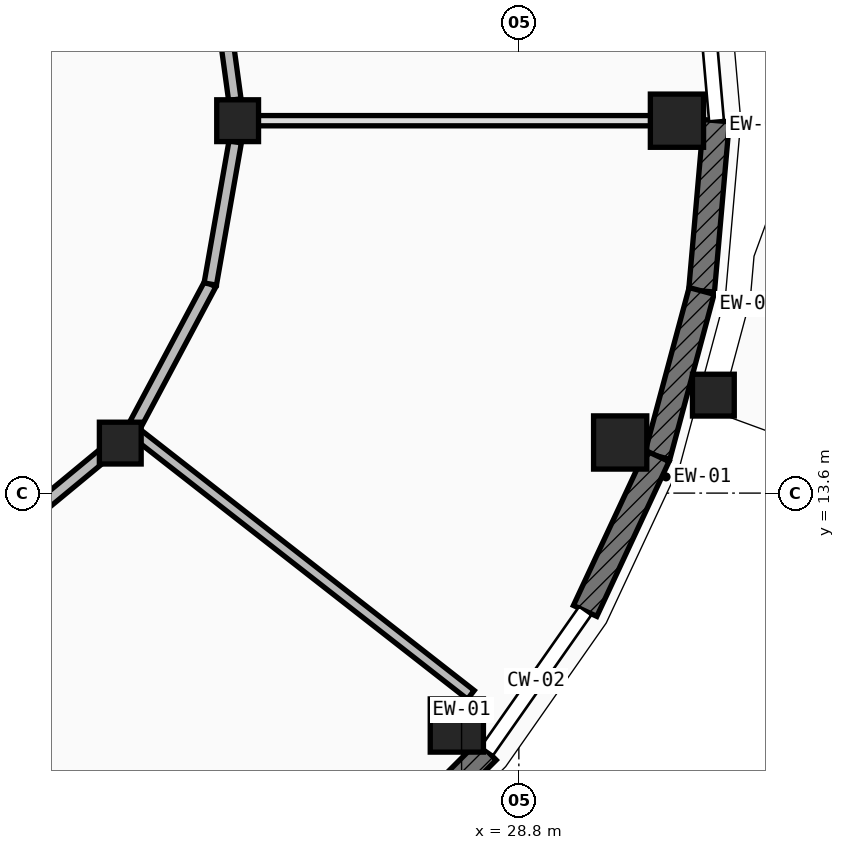
"""IFC4 building model, lengths in metres.
Left out: names, types, materials, properties, quantities, classifications, styles, units other than length and angle.
Written with IfcOpenShell. Run it as: python <this file> out.ifc"""

import sys

from ifc_helpers import new_model, si_unit, direction, frame, frame_2d, origin, origin_2d, place, context, subcontext, project, spatial, rectangle, circle, extrude, element, fill, save


model = new_model("IFC4")
c1 = context("Model", 3, precision=1e-05, world=origin(), true_north=direction((0.0, 1.0)))
c2 = subcontext(c1, "Body", "Model", "MODEL_VIEW")
j1 = project(units=[si_unit("LENGTHUNIT", "METRE"), si_unit("PLANEANGLEUNIT", "RADIAN")], contexts=[c1])
p1 = place(None, origin())
s1 = spatial("IfcSite", under=j1, at=p1, CompositionType="ELEMENT")
p2 = place(p1, origin())
s2 = spatial("IfcBuilding", under=s1, at=p2, CompositionType="ELEMENT")
p3 = place(p2, origin())
s3 = spatial("IfcBuildingStorey", under=s2, at=p3, CompositionType="ELEMENT", Elevation=0.0)
for number, where, z_axis, x_axis in (
    (1, (30.88, 18.5, 0.0), (0.0, 0.0, 1.0), (1.0, 0.0, 0.0)),
    (2, (27.984, 10.542, 0.0), (0.0, 0.0, 1.0), (1.0, 0.0, 0.0)),
    (3, (30.133, 14.266, 0.0), (0.0, 0.0, 1.0), (1.0, 0.0, 0.0)),
):
    element("IfcColumn", number, at=place(p3, frame(where, z_axis=z_axis, x_axis=x_axis)), inside=s3, PredefinedType="COLUMN", context=c2, shape_type="SweptSolid", body=[
        extrude(circle(Radius=0.35, at=origin_2d()), origin(), (0.0, 0.0, 1.0), 4.55),
    ])
for number, where, z_axis, x_axis in (
    (4, (25.1, 18.5, 0.0), (0.0, 0.0, 1.0), (1.0, 0.0, 0.0)),
    (5, (23.556, 14.258, 0.0), (0.0, 0.0, 1.0), (1.0, 0.0, 0.0)),
):
    element("IfcColumn", number, at=place(p3, frame(where, z_axis=z_axis, x_axis=x_axis)), inside=s3, PredefinedType="COLUMN", context=c2, shape_type="SweptSolid", body=[
        extrude(rectangle(XDim=0.55, YDim=0.55, at=origin_2d()), origin(), (0.0, 0.0, 1.0), 4.55),
    ])
p4 = place(p3, frame((31.359, 14.889, 0.0), z_axis=(0.0, 0.0, 1.0), x_axis=(1.0, 0.0, 0.0)))
e6 = element("IfcColumn", 6, at=p4, inside=s3, PredefinedType="PILASTER", context=c2, shape_type="SweptSolid", body=[
    extrude(circle(Radius=0.275, at=origin_2d()), origin(), (0.0, 0.0, 1.0), 4.55),
])
p5 = place(p3, frame((31.4, 18.5, 0.0), z_axis=(0.0, 0.0, 1.0), x_axis=(-0.087079400775, -0.996201374201, 0.0)))
e7 = element("IfcWall", 7, at=p5, inside=s3, PredefinedType="SOLIDWALL", context=c2, shape_type="SweptSolid", body=[
    extrude(rectangle(XDim=2.249, YDim=0.34, at=frame_2d((1.124, 0.0))), origin(), (0.0, 0.0, 1.0), 3.659),
])
p6 = place(p3, frame((31.204, 16.26, 0.0), z_axis=(0.0, 0.0, 1.0), x_axis=(-0.258824721145, -0.96592430538, 0.0)))
e8 = element("IfcWall", 8, at=p6, inside=s3, PredefinedType="SOLIDWALL", context=c2, shape_type="SweptSolid", body=[
    extrude(rectangle(XDim=2.249, YDim=0.34, at=frame_2d((1.125, 0.0))), origin(), (0.0, 0.0, 1.0), 3.659),
])
p7 = place(p3, frame((30.622, 14.088, 0.0), z_axis=(0.0, 0.0, 1.0), x_axis=(-0.422504983593, -0.906360600886, 0.0)))
e9 = element("IfcWall", 9, at=p7, inside=s3, PredefinedType="SOLIDWALL", context=c2, shape_type="SweptSolid", body=[
    extrude(rectangle(XDim=2.248, YDim=0.34, at=frame_2d((1.124, 0.0))), origin(), (0.0, 0.0, 1.0), 3.659),
])
p8 = place(p3, frame((28.382, 10.208, 0.0), z_axis=(0.0, 0.0, 1.0), x_axis=(-0.707106781187, -0.707106781187, 0.0)))
e10 = element("IfcWall", 10, at=p8, inside=s3, PredefinedType="SOLIDWALL", context=c2, shape_type="SweptSolid", body=[
    extrude(rectangle(XDim=2.249, YDim=0.34, at=frame_2d((1.125, 0.0))), origin(), (0.0, 0.0, 1.0), 3.659),
])
p9 = place(p3, frame((23.766, 14.386, 0.0), z_axis=(0.0, 0.0, 1.0), x_axis=(0.787938235079, -0.615754283542, 0.0)))
e11 = element("IfcWall", 11, at=p9, inside=s3, PredefinedType="PARTITIONING", context=c2, shape_type="SweptSolid", body=[
    extrude(rectangle(XDim=5.587, YDim=0.145, at=frame_2d((2.793, 0.0))), origin(), (0.0, 0.0, 1.0), 3.634),
])
p10 = place(p3, frame((25.183, 18.5, 0.0), z_axis=(0.0, 0.0, 1.0), x_axis=(1.0, 0.0, 0.0)))
e12 = element("IfcWall", 12, at=p10, inside=s3, PredefinedType="PLUMBINGWALL", context=c2, shape_type="SweptSolid", body=[
    extrude(rectangle(XDim=5.616, YDim=0.135, at=frame_2d((2.808, 0.0))), origin(), (0.0, 0.0, 1.0), 3.634),
])
p11 = place(p3, frame((21.934, 12.95, 0.0), z_axis=(0.0, 0.0, 1.0), x_axis=(0.770643994758, 0.63726590474, 0.0)))
e13 = element("IfcWall", 13, at=p11, inside=s3, PredefinedType="PARTITIONING", context=c2, shape_type="SweptSolid", body=[
    extrude(rectangle(XDim=1.805, YDim=0.165, at=frame_2d((0.902, 0.0))), origin(), (0.0, 0.0, 1.0), 3.634),
])
p12 = place(p11, frame((0.332, 0.0, 0.0)))
e14 = element("IfcOpeningElement", 14, at=p12, cuts=e13, PredefinedType="OPENING", context=c2, shape_type="SweptSolid", body=[
    extrude(rectangle(XDim=1.14, YDim=2.28, at=frame_2d((0.57, 1.14))), frame((0.0, 0.093, 0.0), z_axis=(0.0, -1.0, 0.0), x_axis=(1.0, 0.0, 0.0)), (0.0, 0.0, 1.0), 0.185),
])
p13 = place(p3, frame((23.761, 14.514, 0.0), z_axis=(0.0, 0.0, 1.0), x_axis=(0.470283853227, 0.882515210857, 0.0)))
e15 = element("IfcWall", 15, at=p13, inside=s3, PredefinedType="PARTITIONING", context=c2, shape_type="SweptSolid", body=[
    extrude(rectangle(XDim=2.082, YDim=0.165, at=frame_2d((1.041, 0.0))), origin(), (0.0, 0.0, 1.0), 3.634),
])
p14 = place(p13, frame((0.411, 0.0, 0.0)))
e16 = element("IfcOpeningElement", 16, at=p14, cuts=e15, PredefinedType="OPENING", context=c2, shape_type="SweptSolid", body=[
    extrude(rectangle(XDim=1.26, YDim=2.28, at=frame_2d((0.63, 1.14))), frame((0.0, 0.093, 0.0), z_axis=(0.0, -1.0, 0.0), x_axis=(1.0, 0.0, 0.0)), (0.0, 0.0, 1.0), 0.185),
])
p15 = place(p3, frame((24.74, 16.351, 0.0), z_axis=(0.0, 0.0, 1.0), x_axis=(0.172751349053, 0.984965467111, 0.0)))
e17 = element("IfcWall", 17, at=p15, inside=s3, PredefinedType="PARTITIONING", context=c2, shape_type="SweptSolid", body=[
    extrude(rectangle(XDim=1.899, YDim=0.165, at=frame_2d((0.95, 0.0))), origin(), (0.0, 0.0, 1.0), 3.634),
])
p16 = place(p3, frame((25.063, 18.777, 0.0), z_axis=(0.0, 0.0, 1.0), x_axis=(-0.135200327393, 0.99081828378, 0.0)))
e18 = element("IfcWall", 18, at=p16, inside=s3, PredefinedType="PARTITIONING", context=c2, shape_type="SweptSolid", body=[
    extrude(rectangle(XDim=1.5, YDim=0.165, at=frame_2d((0.75, 0.0))), origin(), (0.0, 0.0, 1.0), 3.634),
])
p17 = place(p16, frame((0.3, 0.0, 0.0)))
e19 = element("IfcOpeningElement", 19, at=p17, cuts=e18, PredefinedType="OPENING", context=c2, shape_type="SweptSolid", body=[
    extrude(rectangle(XDim=0.9, YDim=2.1, at=frame_2d((0.45, 1.05))), frame((0.0, 0.093, 0.0), z_axis=(0.0, -1.0, 0.0), x_axis=(1.0, 0.0, 0.0)), (0.0, 0.0, 1.0), 0.185),
])
p18 = place(p12, origin())
e20 = element("IfcDoor", 20, at=p18, inside=s3, OperationType="SINGLE_SWING_LEFT", PredefinedType="DOOR", context=c2, shape_type="SweptSolid", body=[
    extrude(rectangle(XDim=1.14, YDim=2.28, at=frame_2d((0.57, 1.14))), frame((0.0, 0.025, 0.0), z_axis=(0.0, -1.0, 0.0), x_axis=(1.0, 0.0, 0.0)), (0.0, 0.0, 1.0), 0.05),
])
fill(e14, e20)
p19 = place(p14, origin())
e21 = element("IfcDoor", 21, at=p19, inside=s3, OperationType="SINGLE_SWING_RIGHT", PredefinedType="DOOR", context=c2, shape_type="SweptSolid", body=[
    extrude(rectangle(XDim=1.26, YDim=2.28, at=frame_2d((0.63, 1.14))), frame((0.0, 0.025, 0.0), z_axis=(0.0, -1.0, 0.0), x_axis=(1.0, 0.0, 0.0)), (0.0, 0.0, 1.0), 0.05),
])
fill(e16, e21)
p20 = place(p17, origin())
e22 = element("IfcDoor", 22, at=p20, inside=s3, OperationType="SINGLE_SWING_LEFT", PredefinedType="DOOR", context=c2, shape_type="SweptSolid", body=[
    extrude(rectangle(XDim=0.9, YDim=2.1, at=frame_2d((0.45, 1.05))), frame((0.0, 0.025, 0.0), z_axis=(0.0, -1.0, 0.0), x_axis=(1.0, 0.0, 0.0)), (0.0, 0.0, 1.0), 0.05),
])
fill(e19, e22)
save(model, sys.argv[1])
